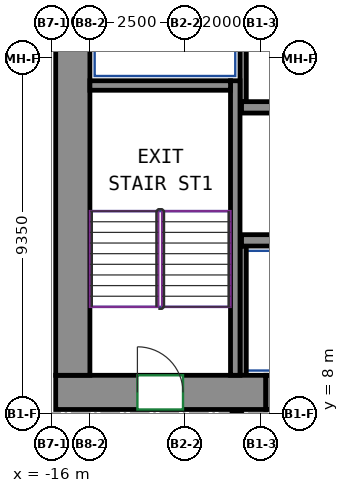
"""IFC4 building model, lengths in metres.
Left out: names, types, materials, properties, quantities, classifications, styles, units other than length and angle.
Written with IfcOpenShell. Run it as: python <this file> out.ifc"""

import sys

from ifc_helpers import new_model, si_unit, direction, frame, frame_2d, origin, place, context, subcontext, project, spatial, rectangle, extrude, source, transform, mapped, element, fill, save


model = new_model("IFC4")
c1 = context("Model", 3, precision=1e-05, world=origin(), true_north=direction((0.0, 1.0)))
c2 = subcontext(c1, "Body", "Model", "MODEL_VIEW")
j1 = project(units=[si_unit("LENGTHUNIT", "METRE"), si_unit("PLANEANGLEUNIT", "RADIAN")], contexts=[c1])
p1 = place(None, origin())
s1 = spatial("IfcSite", under=j1, at=p1, CompositionType="ELEMENT")
p2 = place(p1, origin())
s2 = spatial("IfcBuilding", under=s1, at=p2, CompositionType="ELEMENT")
p3 = place(p2, frame((0.0, 0.0, 154.1)))
s3 = spatial("IfcBuildingStorey", under=s2, at=p3, CompositionType="ELEMENT", Elevation=154.1)
m1 = source(origin(), c2, "Body", "SweptSolid", [
    extrude(rectangle(XDim=5.53, YDim=0.9, at=frame_2d((2.765, 0.0))), origin(), (0.0, 0.0, 1.0), 3.12),
])
p4 = place(p3, frame((-15.9, 8.55, 0.0), z_axis=(0.0, 0.0, 1.0), x_axis=(1.0, 0.0, 0.0)))
e1 = element("IfcWall", 1, at=p4, inside=s3, PredefinedType="SHEAR", context=c2, shape_type="MappedRepresentation", body=[
    mapped(m1, transform((0.0, 0.0, 0.0))),
])
p5 = place(p4, frame((2.15, 0.0, 0.0)))
e2 = element("IfcOpeningElement", 2, at=p5, cuts=e1, PredefinedType="OPENING", context=c2, shape_type="SweptSolid", body=[
    extrude(rectangle(XDim=1.2, YDim=2.1, at=frame_2d((0.6, 1.05))), frame((0.0, 0.46, 0.0), z_axis=(0.0, -1.0, 0.0), x_axis=(1.0, 0.0, 0.0)), (0.0, 0.0, 1.0), 0.92),
])
m2 = source(origin(), c2, "Body", "SweptSolid", [
    extrude(rectangle(XDim=12.0, YDim=0.9, at=frame_2d((6.0, 0.0))), origin(), (0.0, 0.0, 1.0), 3.12),
])
p6 = place(p3, frame((-15.45, 9.0, 0.0), z_axis=(0.0, 0.0, 1.0), x_axis=(0.0, 1.0, 0.0)))
e3 = element("IfcWall", 3, at=p6, inside=s3, PredefinedType="SHEAR", context=c2, shape_type="MappedRepresentation", body=[
    mapped(m2, transform((0.0, 0.0, 0.0))),
])
m3 = source(origin(), c2, "Body", "SweptSolid", [
    extrude(rectangle(XDim=7.75, YDim=0.25, at=frame_2d((3.875, 0.0))), origin(), (0.0, 0.0, 1.0), 3.12),
])
p7 = place(p3, frame((-11.175, 9.0, 0.0), z_axis=(0.0, 0.0, 1.0), x_axis=(0.0, 1.0, 0.0)))
e4 = element("IfcWall", 4, at=p7, inside=s3, PredefinedType="SHEAR", context=c2, shape_type="MappedRepresentation", body=[
    mapped(m3, transform((0.0, 0.0, 0.0))),
])
m4 = source(origin(), c2, "Body", "SweptSolid", [
    extrude(rectangle(XDim=3.7, YDim=0.25, at=frame_2d((1.85, 0.0))), origin(), (0.0, 0.0, 1.0), 3.12),
])
p8 = place(p3, frame((-15.0, 16.625, 0.0), z_axis=(0.0, 0.0, 1.0), x_axis=(1.0, 0.0, 0.0)))
e5 = element("IfcWall", 5, at=p8, inside=s3, PredefinedType="SHEAR", context=c2, shape_type="MappedRepresentation", body=[
    mapped(m4, transform((0.0, 0.0, 0.0))),
])
m5 = source(origin(), c2, "Body", "SweptSolid", [
    extrude(rectangle(XDim=6.0, YDim=0.3, at=frame_2d((3.0, 0.0))), origin(), (0.0, 0.0, 1.0), 3.12),
])
p9 = place(p3, frame((-11.01, 12.55, 0.0), z_axis=(0.0, 0.0, 1.0), x_axis=(1.0, 0.0, 0.0)))
e6 = element("IfcWall", 6, at=p9, inside=s3, PredefinedType="SHEAR", context=c2, shape_type="MappedRepresentation", body=[
    mapped(m5, transform((0.0, 0.0, 0.0))),
])
m6 = source(origin(), c2, "Body", "SweptSolid", [
    extrude(rectangle(XDim=14.04, YDim=0.3, at=frame_2d((7.02, 0.0))), origin(), (0.0, 0.0, 1.0), 3.12),
])
p10 = place(p3, frame((-11.01, 16.05, 0.0), z_axis=(0.0, 0.0, 1.0), x_axis=(1.0, 0.0, 0.0)))
e7 = element("IfcWall", 7, at=p10, inside=s3, PredefinedType="SHEAR", context=c2, shape_type="MappedRepresentation", body=[
    mapped(m6, transform((0.0, 0.0, 0.0))),
])
m7 = source(origin(), c2, "Body", "SweptSolid", [
    extrude(rectangle(XDim=4.8, YDim=0.165, at=frame_2d((2.4, 0.0))), origin(), (0.0, 0.0, 1.0), 3.12),
])
p11 = place(p3, frame((-10.968, 16.2, 0.0), z_axis=(0.0, 0.0, 1.0), x_axis=(0.0, 1.0, 0.0)))
e8 = element("IfcWall", 8, at=p11, inside=s3, PredefinedType="PARTITIONING", context=c2, shape_type="MappedRepresentation", body=[
    mapped(m7, transform((0.0, 0.0, 0.0))),
])
m8 = source(origin(), c2, "Body", "SweptSolid", [
    extrude(rectangle(XDim=3.4, YDim=0.165, at=frame_2d((1.7, 0.0))), origin(), (0.0, 0.0, 1.0), 3.12),
])
p12 = place(p3, frame((-10.968, 9.0, 0.0), z_axis=(0.0, 0.0, 1.0), x_axis=(0.0, 1.0, 0.0)))
e9 = element("IfcWall", 9, at=p12, inside=s3, PredefinedType="PARTITIONING", context=c2, shape_type="MappedRepresentation", body=[
    mapped(m8, transform((0.0, 0.0, 0.0))),
])
m9 = source(origin(), c2, "Body", "SweptSolid", [
    extrude(rectangle(XDim=1.4, YDim=0.9, at=frame_2d((0.7, 0.0))), origin(), (0.0, 0.0, 1.0), 2.7),
])
p13 = place(p3, frame((-10.37, 8.55, 0.0), z_axis=(0.0, 0.0, 1.0), x_axis=(1.0, 0.0, 0.0)))
e10 = element("IfcWall", 10, at=p13, inside=s3, PredefinedType="PARTITIONING", context=c2, shape_type="MappedRepresentation", body=[
    mapped(m9, transform((0.0, 0.0, 0.0))),
])
p14 = place(p13, frame((0.25, 0.0, 0.0)))
e11 = element("IfcOpeningElement", 11, at=p14, cuts=e10, PredefinedType="OPENING", context=c2, shape_type="SweptSolid", body=[
    extrude(rectangle(XDim=0.9, YDim=2.1, at=frame_2d((0.45, 1.05))), frame((0.0, 0.46, 0.0), z_axis=(0.0, -1.0, 0.0), x_axis=(1.0, 0.0, 0.0)), (0.0, 0.0, 1.0), 0.92),
])
p15 = place(p5, origin())
e12 = element("IfcDoor", 12, at=p15, inside=s3, OperationType="DOUBLE_DOOR_SINGLE_SWING", PredefinedType="DOOR", context=c2, shape_type="SweptSolid", body=[
    extrude(rectangle(XDim=1.2, YDim=2.1, at=frame_2d((0.6, 1.05))), frame((0.0, 0.355, 0.0), z_axis=(0.0, -1.0, 0.0), x_axis=(1.0, 0.0, 0.0)), (0.0, 0.0, 1.0), 0.05),
])
fill(e2, e12)
save(model, sys.argv[1])
